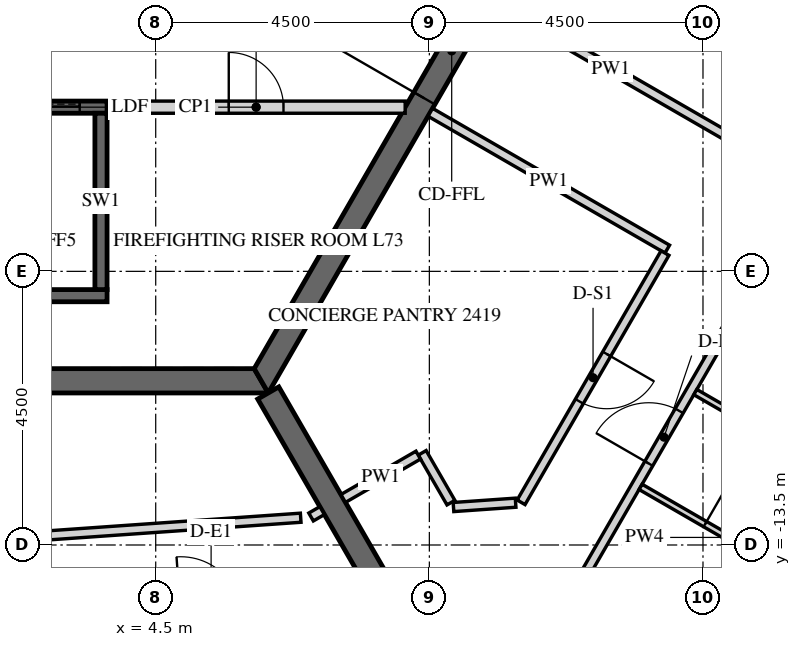
"""IFC4 building model, lengths in metres.
Left out: names, types, materials, properties, quantities, classifications, styles, units other than length and angle.
Written with IfcOpenShell. Run it as: python <this file> out.ifc"""

import sys

from ifc_helpers import new_model, si_unit, direction, frame, frame_2d, origin, place, context, subcontext, project, spatial, polyline, rectangle, outline, extrude, element, fill, save


model = new_model("IFC4")
c1 = context("Model", 3, precision=1e-05, world=origin(), true_north=direction((0.0, 1.0)))
c2 = subcontext(c1, "Body", "Model", "MODEL_VIEW")
j1 = project(units=[si_unit("LENGTHUNIT", "METRE"), si_unit("PLANEANGLEUNIT", "RADIAN")], contexts=[c1])
p1 = place(None, origin())
s1 = spatial("IfcSite", under=j1, at=p1, CompositionType="ELEMENT")
p2 = place(p1, origin())
s2 = spatial("IfcBuilding", under=s1, at=p2, CompositionType="ELEMENT")
p3 = place(p2, frame((0.0, 0.0, 303.0)))
s3 = spatial("IfcBuildingStorey", under=s2, at=p3, CompositionType="ELEMENT", Elevation=303.0)
p4 = place(p3, frame((-6.235, -10.8, -0.15), z_axis=(0.0, 0.0, 1.0), x_axis=(1.0, 0.0, 0.0)))
e1 = element("IfcWall", 1, at=p4, inside=s3, PredefinedType="SHEAR", context=c2, shape_type="SweptSolid", body=[
    extrude(outline(polyline([(-0.115, -0.2), (12.586, -0.2), (12.355, 0.2), (0.115, 0.2), (-0.115, -0.2)])), origin(), (0.0, 0.0, 1.0), 3.9),
])
p5 = place(p3, frame((6.235, -10.8, -0.15), z_axis=(0.0, 0.0, 1.0), x_axis=(0.499996419489, 0.866027470984, 0.0)))
e2 = element("IfcWall", 2, at=p5, inside=s3, PredefinedType="SHEAR", context=c2, shape_type="SweptSolid", body=[
    extrude(outline(polyline([(-0.115, -0.2), (12.586, -0.2), (12.355, 0.2), (0.115, 0.2), (-0.115, -0.2)])), origin(), (0.0, 0.0, 1.0), 3.9),
])
p6 = place(p5, frame((5.364, 0.0, 0.15)))
e3 = element("IfcOpeningElement", 3, at=p6, cuts=e2, PredefinedType="OPENING", context=c2, shape_type="SweptSolid", body=[
    extrude(rectangle(XDim=1.8, YDim=2.4, at=frame_2d((0.9, 1.2))), frame((0.0, 0.21, 0.0), z_axis=(0.0, -1.0, 0.0), x_axis=(1.0, 0.0, 0.0)), (0.0, 0.0, 1.0), 0.42),
])
p7 = place(p3, frame((6.351, -11.0, -0.15), z_axis=(0.0, 0.0, 1.0), x_axis=(0.499998894578, -0.866026041999, 0.0)))
e4 = element("IfcWall", 4, at=p7, inside=s3, PredefinedType="SHEAR", context=c2, shape_type="SweptSolid", body=[
    extrude(rectangle(XDim=15.544, YDim=0.4, at=frame_2d((7.772, 0.0))), origin(), (0.0, 0.0, 1.0), 3.9),
])
p8 = place(p7, frame((6.872, 0.0, 0.15)))
e5 = element("IfcOpeningElement", 5, at=p8, cuts=e4, PredefinedType="OPENING", context=c2, shape_type="SweptSolid", body=[
    extrude(rectangle(XDim=1.8, YDim=2.4, at=frame_2d((0.9, 1.2))), frame((0.0, 0.21, 0.0), z_axis=(0.0, -1.0, 0.0), x_axis=(1.0, 0.0, 0.0)), (0.0, 0.0, 1.0), 0.42),
])
p9 = place(p3, frame((-5.5, -6.3, -0.25), z_axis=(0.0, 0.0, 1.0), x_axis=(1.0, 0.0, 0.0)))
e6 = element("IfcWall", 6, at=p9, inside=s3, PredefinedType="SHEAR", context=c2, shape_type="SweptSolid", body=[
    extrude(rectangle(XDim=9.2, YDim=0.2, at=frame_2d((4.6, 0.0))), origin(), (0.0, 0.0, 1.0), 3.9),
])
p10 = place(p9, frame((0.45, 0.0, 0.25)))
e7 = element("IfcOpeningElement", 7, at=p10, cuts=e6, PredefinedType="OPENING", context=c2, shape_type="SweptSolid", body=[
    extrude(rectangle(XDim=1.1, YDim=2.1, at=frame_2d((0.55, 1.05))), frame((0.0, 0.11, 0.0), z_axis=(0.0, -1.0, 0.0), x_axis=(1.0, 0.0, 0.0)), (0.0, 0.0, 1.0), 0.22),
])
p11 = place(p9, frame((2.25, 0.0, 0.25)))
e8 = element("IfcOpeningElement", 8, at=p11, cuts=e6, PredefinedType="OPENING", context=c2, shape_type="SweptSolid", body=[
    extrude(rectangle(XDim=1.1, YDim=2.1, at=frame_2d((0.55, 1.05))), frame((0.0, 0.11, 0.0), z_axis=(0.0, -1.0, 0.0), x_axis=(1.0, 0.0, 0.0)), (0.0, 0.0, 1.0), 0.22),
])
p12 = place(p9, frame((4.05, 0.0, 0.25)))
e9 = element("IfcOpeningElement", 9, at=p12, cuts=e6, PredefinedType="OPENING", context=c2, shape_type="SweptSolid", body=[
    extrude(rectangle(XDim=1.1, YDim=2.1, at=frame_2d((0.55, 1.05))), frame((0.0, 0.11, 0.0), z_axis=(0.0, -1.0, 0.0), x_axis=(1.0, 0.0, 0.0)), (0.0, 0.0, 1.0), 0.22),
])
p13 = place(p9, frame((5.85, 0.0, 0.25)))
e10 = element("IfcOpeningElement", 10, at=p13, cuts=e6, PredefinedType="OPENING", context=c2, shape_type="SweptSolid", body=[
    extrude(rectangle(XDim=1.1, YDim=2.1, at=frame_2d((0.55, 1.05))), frame((0.0, 0.11, 0.0), z_axis=(0.0, -1.0, 0.0), x_axis=(1.0, 0.0, 0.0)), (0.0, 0.0, 1.0), 0.22),
])
p14 = place(p9, frame((7.65, 0.0, 0.25)))
e11 = element("IfcOpeningElement", 11, at=p14, cuts=e6, PredefinedType="OPENING", context=c2, shape_type="SweptSolid", body=[
    extrude(rectangle(XDim=1.1, YDim=2.1, at=frame_2d((0.55, 1.05))), frame((0.0, 0.11, 0.0), z_axis=(0.0, -1.0, 0.0), x_axis=(1.0, 0.0, 0.0)), (0.0, 0.0, 1.0), 0.22),
])
p15 = place(p3, frame((-5.5, -9.4, -0.25), z_axis=(0.0, 0.0, 1.0), x_axis=(1.0, 0.0, 0.0)))
e12 = element("IfcWall", 12, at=p15, inside=s3, PredefinedType="SHEAR", context=c2, shape_type="SweptSolid", body=[
    extrude(rectangle(XDim=9.2, YDim=0.2, at=frame_2d((4.6, 0.0))), origin(), (0.0, 0.0, 1.0), 3.9),
])
p16 = place(p3, frame((3.6, -9.3, -0.25), z_axis=(0.0, 0.0, 1.0), x_axis=(0.0, 1.0, 0.0)))
e13 = element("IfcWall", 13, at=p16, inside=s3, PredefinedType="SHEAR", context=c2, shape_type="SweptSolid", body=[
    extrude(rectangle(XDim=2.9, YDim=0.2, at=frame_2d((1.45, 0.0))), origin(), (0.0, 0.0, 1.0), 3.9),
])
p17 = place(p3, frame((3.7, -6.3, 0.0), z_axis=(0.0, 0.0, 1.0), x_axis=(1.0, 0.0, 0.0)))
e14 = element("IfcWall", 14, at=p17, inside=s3, PredefinedType="PARTITIONING", context=c2, shape_type="SweptSolid", body=[
    extrude(rectangle(XDim=4.903, YDim=0.2, at=frame_2d((2.451, 0.0))), origin(), (0.0, 0.0, 1.0), 3.65),
])
p18 = place(p17, frame((2.001, 0.0, 0.0)))
e15 = element("IfcOpeningElement", 15, at=p18, cuts=e14, PredefinedType="OPENING", context=c2, shape_type="SweptSolid", body=[
    extrude(rectangle(XDim=0.9, YDim=2.1, at=frame_2d((0.45, 1.05))), frame((0.0, 0.11, 0.0), z_axis=(0.0, -1.0, 0.0), x_axis=(1.0, 0.0, 0.0)), (0.0, 0.0, 1.0), 0.22),
])
p19 = place(p3, frame((7.237, -12.935, 0.0), z_axis=(0.0, 0.0, 1.0), x_axis=(-0.866088799389, -0.499890179513, 0.0)))
e16 = element("IfcWall", 16, at=p19, inside=s3, PredefinedType="PARTITIONING", context=c2, shape_type="SweptSolid", body=[
    extrude(rectangle(XDim=0.21, YDim=0.15, at=frame_2d((0.105, 0.0))), origin(), (0.0, 0.0, 1.0), 2.988),
])
p20 = place(p3, frame((6.884, -13.052, 0.0), z_axis=(0.0, 0.0, 1.0), x_axis=(-0.997564224443, -0.069753982764, 0.0)))
e17 = element("IfcWall", 17, at=p20, inside=s3, PredefinedType="PARTITIONING", context=c2, shape_type="SweptSolid", body=[
    extrude(rectangle(XDim=16.618, YDim=0.15, at=frame_2d((8.309, 0.0))), origin(), (0.0, 0.0, 1.0), 2.988),
])
p21 = place(p20, frame((7.859, 0.0, 0.0)))
e18 = element("IfcOpeningElement", 18, at=p21, cuts=e17, PredefinedType="OPENING", context=c2, shape_type="SweptSolid", body=[
    extrude(rectangle(XDim=0.9, YDim=2.1, at=frame_2d((0.45, 1.05))), frame((0.0, 0.085, 0.0), z_axis=(0.0, -1.0, 0.0), x_axis=(1.0, 0.0, 0.0)), (0.0, 0.0, 1.0), 0.17),
])
p22 = place(p3, frame((11.447, -14.174, 0.0), z_axis=(0.0, 0.0, 1.0), x_axis=(0.500003306199, 0.866023494941, 0.0)))
e19 = element("IfcWall", 19, at=p22, inside=s3, PredefinedType="PARTITIONING", context=c2, shape_type="SweptSolid", body=[
    extrude(rectangle(XDim=14.949, YDim=0.15, at=frame_2d((7.475, 0.0))), origin(), (0.0, 0.0, 1.0), 2.988),
])
p23 = place(p22, frame((2.325, 0.0, 0.0)))
e20 = element("IfcOpeningElement", 20, at=p23, cuts=e19, PredefinedType="OPENING", context=c2, shape_type="SweptSolid", body=[
    extrude(rectangle(XDim=1.0, YDim=2.1, at=frame_2d((0.5, 1.05))), frame((0.0, 0.085, 0.0), z_axis=(0.0, -1.0, 0.0), x_axis=(1.0, 0.0, 0.0)), (0.0, 0.0, 1.0), 0.17),
])
p24 = place(p22, frame((13.776, 0.0, 0.0)))
e21 = element("IfcOpeningElement", 21, at=p24, cuts=e19, PredefinedType="OPENING", context=c2, shape_type="SweptSolid", body=[
    extrude(rectangle(XDim=1.0, YDim=2.1, at=frame_2d((0.5, 1.05))), frame((0.0, 0.085, 0.0), z_axis=(0.0, -1.0, 0.0), x_axis=(1.0, 0.0, 0.0)), (0.0, 0.0, 1.0), 0.17),
])
p25 = place(p3, frame((13.898, -6.778, 0.0), z_axis=(0.0, 0.0, 1.0), x_axis=(-0.866041342403, 0.499972392486, 0.0)))
e22 = element("IfcWall", 22, at=p25, inside=s3, PredefinedType="PARTITIONING", context=c2, shape_type="SweptSolid", body=[
    extrude(rectangle(XDim=4.425, YDim=0.15, at=frame_2d((2.212, 0.0))), origin(), (0.0, 0.0, 1.0), 2.988),
])
p26 = place(p3, frame((9.016, -6.384, 0.0), z_axis=(0.0, 0.0, 1.0), x_axis=(0.866031096941, -0.499990139034, 0.0)))
e23 = element("IfcWall", 23, at=p26, inside=s3, PredefinedType="PARTITIONING", context=c2, shape_type="SweptSolid", body=[
    extrude(rectangle(XDim=4.5, YDim=0.15, at=frame_2d((2.25, 0.0))), origin(), (0.0, 0.0, 1.0), 2.988),
])
p27 = place(p3, frame((12.875, -8.699, 0.0), z_axis=(0.0, 0.0, 1.0), x_axis=(-0.49999482868, -0.866028389427, 0.0)))
e24 = element("IfcWall", 24, at=p27, inside=s3, PredefinedType="PARTITIONING", context=c2, shape_type="SweptSolid", body=[
    extrude(rectangle(XDim=4.733, YDim=0.15, at=frame_2d((2.366, 0.0))), origin(), (0.0, 0.0, 1.0), 2.988),
])
p28 = place(p27, frame((1.917, 0.0, 0.0)))
e25 = element("IfcOpeningElement", 25, at=p28, cuts=e24, PredefinedType="OPENING", context=c2, shape_type="SweptSolid", body=[
    extrude(rectangle(XDim=0.9, YDim=2.1, at=frame_2d((0.45, 1.05))), frame((0.0, 0.085, 0.0), z_axis=(0.0, -1.0, 0.0), x_axis=(1.0, 0.0, 0.0)), (0.0, 0.0, 1.0), 0.17),
])
p29 = place(p3, frame((10.419, -12.804, 0.0), z_axis=(0.0, 0.0, 1.0), x_axis=(-0.997558136861, -0.069840987838, 0.0)))
e26 = element("IfcWall", 26, at=p29, inside=s3, PredefinedType="PARTITIONING", context=c2, shape_type="SweptSolid", body=[
    extrude(rectangle(XDim=1.024, YDim=0.15, at=frame_2d((0.512, 0.0))), origin(), (0.0, 0.0, 1.0), 2.988),
])
p30 = place(p3, frame((9.355, -12.804, 0.0), z_axis=(0.0, 0.0, 1.0), x_axis=(-0.499998034377, 0.866026538634, 0.0)))
e27 = element("IfcWall", 27, at=p30, inside=s3, PredefinedType="PARTITIONING", context=c2, shape_type="SweptSolid", body=[
    extrude(rectangle(XDim=0.946, YDim=0.15, at=frame_2d((0.473, 0.0))), origin(), (0.0, 0.0, 1.0), 2.988),
])
p31 = place(p3, frame((8.817, -12.022, 0.0), z_axis=(0.0, 0.0, 1.0), x_axis=(-0.866062911188, -0.499935029643, 0.0)))
e28 = element("IfcWall", 28, at=p31, inside=s3, PredefinedType="PARTITIONING", context=c2, shape_type="SweptSolid", body=[
    extrude(rectangle(XDim=1.425, YDim=0.15, at=frame_2d((0.712, 0.0))), origin(), (0.0, 0.0, 1.0), 2.988),
])
p32 = place(p3, frame((13.374, -10.985, 0.0), z_axis=(0.0, 0.0, 1.0), x_axis=(0.866020521143, -0.500008456887, 0.0)))
e29 = element("IfcWall", 29, at=p32, inside=s3, PredefinedType="PARTITIONING", context=c2, shape_type="SweptSolid", body=[
    extrude(rectangle(XDim=3.325, YDim=0.1, at=frame_2d((1.663, 0.0))), origin(), (0.0, 0.0, 1.0), 2.988),
])
p33 = place(p32, frame((1.175, 0.0, 0.0)))
e30 = element("IfcOpeningElement", 30, at=p33, cuts=e29, PredefinedType="OPENING", context=c2, shape_type="SweptSolid", body=[
    extrude(rectangle(XDim=0.9, YDim=2.1, at=frame_2d((0.45, 1.05))), frame((0.0, 0.06, 0.0), z_axis=(0.0, -1.0, 0.0), x_axis=(1.0, 0.0, 0.0)), (0.0, 0.0, 1.0), 0.12),
])
p34 = place(p3, frame((12.474, -12.544, 0.0), z_axis=(0.0, 0.0, 1.0), x_axis=(0.866002163101, -0.500040251884, 0.0)))
e31 = element("IfcWall", 31, at=p34, inside=s3, PredefinedType="PARTITIONING", context=c2, shape_type="SweptSolid", body=[
    extrude(rectangle(XDim=3.325, YDim=0.1, at=frame_2d((1.663, 0.0))), origin(), (0.0, 0.0, 1.0), 2.988),
])
p35 = place(p34, frame((1.225, 0.0, 0.0)))
e32 = element("IfcOpeningElement", 32, at=p35, cuts=e31, PredefinedType="OPENING", context=c2, shape_type="SweptSolid", body=[
    extrude(rectangle(XDim=0.8, YDim=2.1, at=frame_2d((0.4, 1.05))), frame((0.0, 0.06, 0.0), z_axis=(0.0, -1.0, 0.0), x_axis=(1.0, 0.0, 0.0)), (0.0, 0.0, 1.0), 0.12),
])
p36 = place(p6, origin())
e33 = element("IfcDoor", 33, at=p36, inside=s3, OperationType="DOUBLE_DOOR_SINGLE_SWING", PredefinedType="DOOR", context=c2, shape_type="SweptSolid", body=[
    extrude(rectangle(XDim=1.8, YDim=2.4, at=frame_2d((0.9, 1.2))), frame((0.0, 0.025, 0.0), z_axis=(0.0, -1.0, 0.0), x_axis=(1.0, 0.0, 0.0)), (0.0, 0.0, 1.0), 0.05),
])
fill(e3, e33)
p37 = place(p18, origin())
e34 = element("IfcDoor", 34, at=p37, inside=s3, OperationType="SINGLE_SWING_LEFT", PredefinedType="DOOR", context=c2, shape_type="SweptSolid", body=[
    extrude(rectangle(XDim=0.9, YDim=2.1, at=frame_2d((0.45, 1.05))), frame((0.0, 0.025, 0.0), z_axis=(0.0, -1.0, 0.0), x_axis=(1.0, 0.0, 0.0)), (0.0, 0.0, 1.0), 0.05),
])
fill(e15, e34)
p38 = place(p14, origin())
e35 = element("IfcDoor", 35, at=p38, inside=s3, OperationType="SLIDING_TO_LEFT", PredefinedType="DOOR", context=c2, shape_type="SweptSolid", body=[
    extrude(rectangle(XDim=1.1, YDim=2.1, at=frame_2d((0.55, 1.05))), frame((0.0, 0.025, 0.0), z_axis=(0.0, -1.0, 0.0), x_axis=(1.0, 0.0, 0.0)), (0.0, 0.0, 1.0), 0.05),
])
fill(e11, e35)
p39 = place(p23, origin())
e36 = element("IfcDoor", 36, at=p39, inside=s3, OperationType="SINGLE_SWING_LEFT", PredefinedType="DOOR", context=c2, shape_type="SweptSolid", body=[
    extrude(rectangle(XDim=1.0, YDim=2.1, at=frame_2d((0.5, 1.05))), frame((0.0, 0.025, 0.0), z_axis=(0.0, -1.0, 0.0), x_axis=(1.0, 0.0, 0.0)), (0.0, 0.0, 1.0), 0.05),
])
fill(e20, e36)
p40 = place(p35, origin())
e37 = element("IfcDoor", 37, at=p40, inside=s3, OperationType="SINGLE_SWING_RIGHT", PredefinedType="DOOR", context=c2, shape_type="SweptSolid", body=[
    extrude(rectangle(XDim=0.8, YDim=2.1, at=frame_2d((0.4, 1.05))), frame((0.0, 0.025, 0.0), z_axis=(0.0, -1.0, 0.0), x_axis=(1.0, 0.0, 0.0)), (0.0, 0.0, 1.0), 0.05),
])
fill(e32, e37)
p41 = place(p28, origin())
e38 = element("IfcDoor", 38, at=p41, inside=s3, OperationType="SINGLE_SWING_LEFT", PredefinedType="DOOR", context=c2, shape_type="SweptSolid", body=[
    extrude(rectangle(XDim=0.9, YDim=2.1, at=frame_2d((0.45, 1.05))), frame((0.0, 0.025, 0.0), z_axis=(0.0, -1.0, 0.0), x_axis=(1.0, 0.0, 0.0)), (0.0, 0.0, 1.0), 0.05),
])
fill(e25, e38)
save(model, sys.argv[1])
